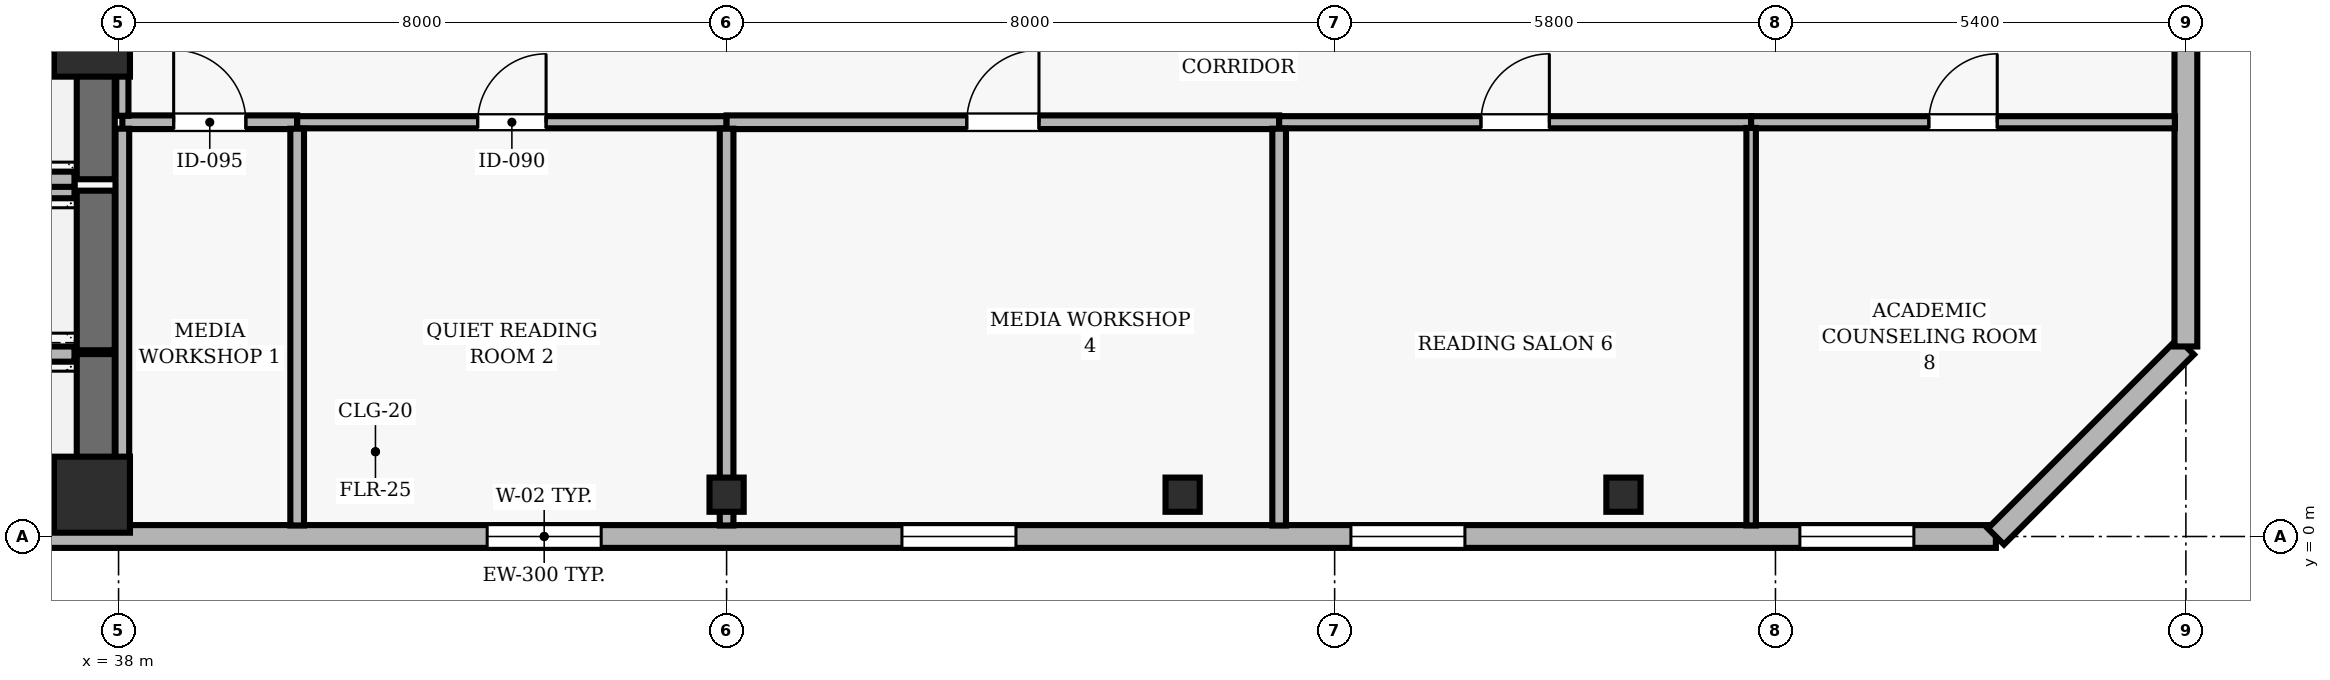
"""IFC4 building model, lengths in metres.
Left out: names, types, materials, properties, quantities, classifications, styles, units other than length and angle.
Written with IfcOpenShell. Run it as: python <this file> out.ifc"""

import sys

from ifc_helpers import new_model, si_unit, direction, frame, frame_2d, origin, origin_2d, place, context, subcontext, project, spatial, rectangle, hollow_rectangle, extrude, element, fill, save


model = new_model("IFC4")
c1 = context("Model", 3, precision=1e-05, world=origin(), true_north=direction((0.0, 1.0)))
c2 = subcontext(c1, "Body", "Model", "MODEL_VIEW")
j1 = project(units=[si_unit("LENGTHUNIT", "METRE"), si_unit("PLANEANGLEUNIT", "RADIAN")], contexts=[c1])
p1 = place(None, origin())
s1 = spatial("IfcSite", under=j1, at=p1, CompositionType="ELEMENT")
p2 = place(p1, origin())
s2 = spatial("IfcBuilding", under=s1, at=p2, CompositionType="ELEMENT")
p3 = place(p2, frame((0.0, 0.0, 203.1)))
s3 = spatial("IfcBuildingStorey", under=s2, at=p3, CompositionType="ELEMENT", Elevation=203.1)
for number, where, z_axis, x_axis in (
    (1, (37.65, 0.55, 0.0), (0.0, 0.0, 1.0), (1.0, 0.0, 0.0)),
    (2, (37.65, 6.55, 0.0), (0.0, 0.0, 1.0), (1.0, 0.0, 0.0)),
):
    element("IfcColumn", number, at=place(p3, frame(where, z_axis=z_axis, x_axis=x_axis)), inside=s3, PredefinedType="COLUMN", context=c2, shape_type="SweptSolid", body=[
        extrude(rectangle(XDim=1.0, YDim=1.0, at=origin_2d()), origin(), (0.0, 0.0, 1.0), 3.9),
    ])
for number, where, z_axis, x_axis in (
    (3, (46.0, 0.55, 0.0), (0.0, 0.0, 1.0), (1.0, 0.0, 0.0)),
    (4, (52.0, 0.55, 0.0), (0.0, 0.0, 1.0), (1.0, 0.0, 0.0)),
    (5, (57.8, 0.55, 0.0), (0.0, 0.0, 1.0), (1.0, 0.0, 0.0)),
):
    element("IfcColumn", number, at=place(p3, frame(where, z_axis=z_axis, x_axis=x_axis)), inside=s3, PredefinedType="COLUMN", context=c2, shape_type="SweptSolid", body=[
        extrude(hollow_rectangle(XDim=0.45, YDim=0.45, WallThickness=0.02, at=origin_2d()), origin(), (0.0, 0.0, 1.0), 3.9),
    ])
p4 = place(p3, frame((24.5, 0.0, 0.0), z_axis=(0.0, 0.0, 1.0), x_axis=(1.0, 0.0, 0.0)))
e6 = element("IfcWall", 6, at=p4, inside=s3, PredefinedType="SOLIDWALL", context=c2, shape_type="SweptSolid", body=[
    extrude(rectangle(XDim=38.2, YDim=0.3, at=frame_2d((19.1, 0.0))), origin(), (0.0, 0.0, 1.0), 3.69),
])
p5 = place(p4, frame((1.979, 0.0, 0.9)))
e7 = element("IfcOpeningElement", 7, at=p5, cuts=e6, PredefinedType="OPENING", context=c2, shape_type="SweptSolid", body=[
    extrude(rectangle(XDim=1.5, YDim=1.6, at=frame_2d((0.75, 0.8))), frame((0.0, 0.16, 0.0), z_axis=(0.0, -1.0, 0.0), x_axis=(1.0, 0.0, 0.0)), (0.0, 0.0, 1.0), 0.32),
])
p6 = place(p4, frame((8.336, 0.0, 0.9)))
e8 = element("IfcOpeningElement", 8, at=p6, cuts=e6, PredefinedType="OPENING", context=c2, shape_type="SweptSolid", body=[
    extrude(rectangle(XDim=1.5, YDim=1.6, at=frame_2d((0.75, 0.8))), frame((0.0, 0.16, 0.0), z_axis=(0.0, -1.0, 0.0), x_axis=(1.0, 0.0, 0.0)), (0.0, 0.0, 1.0), 0.32),
])
p7 = place(p4, frame((18.35, 0.0, 0.9)))
e9 = element("IfcOpeningElement", 9, at=p7, cuts=e6, PredefinedType="OPENING", context=c2, shape_type="SweptSolid", body=[
    extrude(rectangle(XDim=1.5, YDim=1.6, at=frame_2d((0.75, 0.8))), frame((0.0, 0.16, 0.0), z_axis=(0.0, -1.0, 0.0), x_axis=(1.0, 0.0, 0.0)), (0.0, 0.0, 1.0), 0.32),
])
p8 = place(p4, frame((23.807, 0.0, 0.9)))
e10 = element("IfcOpeningElement", 10, at=p8, cuts=e6, PredefinedType="OPENING", context=c2, shape_type="SweptSolid", body=[
    extrude(rectangle(XDim=1.5, YDim=1.6, at=frame_2d((0.75, 0.8))), frame((0.0, 0.16, 0.0), z_axis=(0.0, -1.0, 0.0), x_axis=(1.0, 0.0, 0.0)), (0.0, 0.0, 1.0), 0.32),
])
p9 = place(p4, frame((29.714, 0.0, 0.9)))
e11 = element("IfcOpeningElement", 11, at=p9, cuts=e6, PredefinedType="OPENING", context=c2, shape_type="SweptSolid", body=[
    extrude(rectangle(XDim=1.5, YDim=1.6, at=frame_2d((0.75, 0.8))), frame((0.0, 0.16, 0.0), z_axis=(0.0, -1.0, 0.0), x_axis=(1.0, 0.0, 0.0)), (0.0, 0.0, 1.0), 0.32),
])
p10 = place(p4, frame((35.621, 0.0, 0.9)))
e12 = element("IfcOpeningElement", 12, at=p10, cuts=e6, PredefinedType="OPENING", context=c2, shape_type="SweptSolid", body=[
    extrude(rectangle(XDim=1.5, YDim=1.6, at=frame_2d((0.75, 0.8))), frame((0.0, 0.16, 0.0), z_axis=(0.0, -1.0, 0.0), x_axis=(1.0, 0.0, 0.0)), (0.0, 0.0, 1.0), 0.32),
])
p11 = place(p3, frame((62.7, 0.0, 0.0), z_axis=(0.0, 0.0, 1.0), x_axis=(0.707106781187, 0.707106781187, 0.0)))
e13 = element("IfcWall", 13, at=p11, inside=s3, PredefinedType="SOLIDWALL", context=c2, shape_type="SweptSolid", body=[
    extrude(rectangle(XDim=3.536, YDim=0.3, at=frame_2d((1.768, 0.0))), origin(), (0.0, 0.0, 1.0), 3.69),
])
p12 = place(p3, frame((65.2, 2.5, 0.0), z_axis=(0.0, 0.0, 1.0), x_axis=(0.0, 1.0, 0.0)))
e14 = element("IfcWall", 14, at=p12, inside=s3, PredefinedType="SOLIDWALL", context=c2, shape_type="SweptSolid", body=[
    extrude(rectangle(XDim=11.0, YDim=0.3, at=frame_2d((5.5, 0.0))), origin(), (0.0, 0.0, 1.0), 3.69),
])
p13 = place(p12, frame((7.2, 0.0, 0.9)))
e15 = element("IfcOpeningElement", 15, at=p13, cuts=e14, PredefinedType="OPENING", context=c2, shape_type="SweptSolid", body=[
    extrude(rectangle(XDim=2.1, YDim=1.6, at=frame_2d((1.05, 0.8))), frame((0.0, 0.16, 0.0), z_axis=(0.0, -1.0, 0.0), x_axis=(1.0, 0.0, 0.0)), (0.0, 0.0, 1.0), 0.32),
])
p14 = place(p3, frame((37.7, 0.3, 0.0), z_axis=(0.0, 0.0, 1.0), x_axis=(0.0, 1.0, 0.0)))
e16 = element("IfcWall", 16, at=p14, inside=s3, PredefinedType="SHEAR", context=c2, shape_type="SweptSolid", body=[
    extrude(rectangle(XDim=2.1, YDim=0.5, at=frame_2d((1.05, 0.0))), origin(), (0.0, 0.0, 1.0), 3.69),
])
for number, where, z_axis, x_axis in (
    (17, (35.28, 0.3, 0.0), (0.0, 0.0, 1.0), (1.0, 0.0, 0.0)),
    (18, (37.42, 2.4, 0.0), (0.0, 0.0, 1.0), (-1.0, 0.0, 0.0)),
):
    element("IfcWall", number, at=place(p3, frame(where, z_axis=z_axis, x_axis=x_axis)), inside=s3, PredefinedType="SOLIDWALL", context=c2, shape_type="SweptSolid", body=[
        extrude(rectangle(XDim=2.14, YDim=0.2, at=frame_2d((1.07, 0.0))), origin(), (0.0, 0.0, 1.0), 3.69),
    ])
p15 = place(p3, frame((37.7, 2.45, 0.0), z_axis=(0.0, 0.0, 1.0), x_axis=(0.0, 1.0, 0.0)))
e19 = element("IfcWall", 19, at=p15, inside=s3, PredefinedType="SHEAR", context=c2, shape_type="SweptSolid", body=[
    extrude(rectangle(XDim=2.1, YDim=0.5, at=frame_2d((1.05, 0.0))), origin(), (0.0, 0.0, 1.0), 3.69),
])
p16 = place(p3, frame((37.42, 4.55, 0.0), z_axis=(0.0, 0.0, 1.0), x_axis=(-1.0, 0.0, 0.0)))
e20 = element("IfcWall", 20, at=p16, inside=s3, PredefinedType="SOLIDWALL", context=c2, shape_type="SweptSolid", body=[
    extrude(rectangle(XDim=2.14, YDim=0.2, at=frame_2d((1.07, 0.0))), origin(), (0.0, 0.0, 1.0), 3.69),
])
p17 = place(p3, frame((37.7, 4.7, 0.0), z_axis=(0.0, 0.0, 1.0), x_axis=(0.0, 1.0, 0.0)))
e21 = element("IfcWall", 21, at=p17, inside=s3, PredefinedType="SHEAR", context=c2, shape_type="SweptSolid", body=[
    extrude(rectangle(XDim=2.25, YDim=0.5, at=frame_2d((1.125, 0.0))), origin(), (0.0, 0.0, 1.0), 3.69),
])
p18 = place(p3, frame((35.28, 4.7, 0.0), z_axis=(0.0, 0.0, 1.0), x_axis=(1.0, 0.0, 0.0)))
e22 = element("IfcWall", 22, at=p18, inside=s3, PredefinedType="SOLIDWALL", context=c2, shape_type="SweptSolid", body=[
    extrude(rectangle(XDim=2.14, YDim=0.2, at=frame_2d((1.07, 0.0))), origin(), (0.0, 0.0, 1.0), 3.69),
])
p19 = place(p3, frame((38.05, 5.45, 0.0), z_axis=(0.0, 0.0, 1.0), x_axis=(1.0, 0.0, 0.0)))
e23 = element("IfcWall", 23, at=p19, inside=s3, PredefinedType="PARTITIONING", context=c2, shape_type="SweptSolid", body=[
    extrude(rectangle(XDim=2.3, YDim=0.18, at=frame_2d((1.15, 0.0))), origin(), (0.0, 0.0, 1.0), 3.372),
])
p20 = place(p19, frame((0.675, 0.0, 0.0)))
e24 = element("IfcOpeningElement", 24, at=p20, cuts=e23, PredefinedType="OPENING", context=c2, shape_type="SweptSolid", body=[
    extrude(rectangle(XDim=0.95, YDim=2.1, at=frame_2d((0.475, 1.05))), frame((0.0, 0.1, 0.0), z_axis=(0.0, -1.0, 0.0), x_axis=(1.0, 0.0, 0.0)), (0.0, 0.0, 1.0), 0.2),
])
p21 = place(p3, frame((40.35, 5.45, 0.0), z_axis=(0.0, 0.0, 1.0), x_axis=(1.0, 0.0, 0.0)))
e25 = element("IfcWall", 25, at=p21, inside=s3, PredefinedType="PARTITIONING", context=c2, shape_type="SweptSolid", body=[
    extrude(rectangle(XDim=5.65, YDim=0.16, at=frame_2d((2.825, 0.0))), origin(), (0.0, 0.0, 1.0), 3.372),
])
p22 = place(p21, frame((2.375, 0.0, 0.0)))
e26 = element("IfcOpeningElement", 26, at=p22, cuts=e25, PredefinedType="OPENING", context=c2, shape_type="SweptSolid", body=[
    extrude(rectangle(XDim=0.9, YDim=2.1, at=frame_2d((0.45, 1.05))), frame((0.0, 0.09, 0.0), z_axis=(0.0, -1.0, 0.0), x_axis=(1.0, 0.0, 0.0)), (0.0, 0.0, 1.0), 0.18),
])
p23 = place(p3, frame((46.0, 5.45, 0.0), z_axis=(0.0, 0.0, 1.0), x_axis=(1.0, 0.0, 0.0)))
e27 = element("IfcWall", 27, at=p23, inside=s3, PredefinedType="PARTITIONING", context=c2, shape_type="SweptSolid", body=[
    extrude(rectangle(XDim=7.27, YDim=0.18, at=frame_2d((3.635, 0.0))), origin(), (0.0, 0.0, 1.0), 3.372),
])
p24 = place(p23, frame((3.16, 0.0, 0.0)))
e28 = element("IfcOpeningElement", 28, at=p24, cuts=e27, PredefinedType="OPENING", context=c2, shape_type="SweptSolid", body=[
    extrude(rectangle(XDim=0.95, YDim=2.1, at=frame_2d((0.475, 1.05))), frame((0.0, 0.1, 0.0), z_axis=(0.0, -1.0, 0.0), x_axis=(1.0, 0.0, 0.0)), (0.0, 0.0, 1.0), 0.2),
])
p25 = place(p3, frame((53.27, 5.45, 0.0), z_axis=(0.0, 0.0, 1.0), x_axis=(1.0, 0.0, 0.0)))
e29 = element("IfcWall", 29, at=p25, inside=s3, PredefinedType="PARTITIONING", context=c2, shape_type="SweptSolid", body=[
    extrude(rectangle(XDim=6.21, YDim=0.16, at=frame_2d((3.105, 0.0))), origin(), (0.0, 0.0, 1.0), 3.372),
])
p26 = place(p25, frame((2.655, 0.0, 0.0)))
e30 = element("IfcOpeningElement", 30, at=p26, cuts=e29, PredefinedType="OPENING", context=c2, shape_type="SweptSolid", body=[
    extrude(rectangle(XDim=0.9, YDim=2.1, at=frame_2d((0.45, 1.05))), frame((0.0, 0.09, 0.0), z_axis=(0.0, -1.0, 0.0), x_axis=(1.0, 0.0, 0.0)), (0.0, 0.0, 1.0), 0.18),
])
p27 = place(p3, frame((59.48, 5.45, 0.0), z_axis=(0.0, 0.0, 1.0), x_axis=(1.0, 0.0, 0.0)))
e31 = element("IfcWall", 31, at=p27, inside=s3, PredefinedType="PARTITIONING", context=c2, shape_type="SweptSolid", body=[
    extrude(rectangle(XDim=5.575, YDim=0.16, at=frame_2d((2.788, 0.0))), origin(), (0.0, 0.0, 1.0), 3.69),
])
p28 = place(p27, frame((2.338, 0.0, 0.0)))
e32 = element("IfcOpeningElement", 32, at=p28, cuts=e31, PredefinedType="OPENING", context=c2, shape_type="SweptSolid", body=[
    extrude(rectangle(XDim=0.9, YDim=2.1, at=frame_2d((0.45, 1.05))), frame((0.0, 0.09, 0.0), z_axis=(0.0, -1.0, 0.0), x_axis=(1.0, 0.0, 0.0)), (0.0, 0.0, 1.0), 0.18),
])
p29 = place(p3, frame((38.05, 5.365, 0.0), z_axis=(0.0, 0.0, 1.0), x_axis=(0.0, -1.0, 0.0)))
e33 = element("IfcWall", 33, at=p29, inside=s3, PredefinedType="PARTITIONING", context=c2, shape_type="SweptSolid", body=[
    extrude(rectangle(XDim=5.22, YDim=0.18, at=frame_2d((2.61, 0.0))), origin(), (0.0, 0.0, 1.0), 3.146),
])
p30 = place(p3, frame((38.05, 7.05, 0.0), z_axis=(0.0, 0.0, 1.0), x_axis=(0.0, -1.0, 0.0)))
e34 = element("IfcWall", 34, at=p30, inside=s3, PredefinedType="PARTITIONING", context=c2, shape_type="SweptSolid", body=[
    extrude(rectangle(XDim=1.515, YDim=0.16, at=frame_2d((0.758, 0.0))), origin(), (0.0, 0.0, 1.0), 3.146),
])
p31 = place(p3, frame((40.35, 0.145, 0.0), z_axis=(0.0, 0.0, 1.0), x_axis=(0.0, 1.0, 0.0)))
e35 = element("IfcWall", 35, at=p31, inside=s3, PredefinedType="PARTITIONING", context=c2, shape_type="SweptSolid", body=[
    extrude(rectangle(XDim=5.22, YDim=0.18, at=frame_2d((2.61, 0.0))), origin(), (0.0, 0.0, 1.0), 3.69),
])
p32 = place(p3, frame((46.0, 0.145, 0.0), z_axis=(0.0, 0.0, 1.0), x_axis=(0.0, 1.0, 0.0)))
e36 = element("IfcWall", 36, at=p32, inside=s3, PredefinedType="PARTITIONING", context=c2, shape_type="SweptSolid", body=[
    extrude(rectangle(XDim=5.22, YDim=0.18, at=frame_2d((2.61, 0.0))), origin(), (0.0, 0.0, 1.0), 3.146),
])
p33 = place(p3, frame((53.27, 0.145, 0.0), z_axis=(0.0, 0.0, 1.0), x_axis=(0.0, 1.0, 0.0)))
e37 = element("IfcWall", 37, at=p33, inside=s3, PredefinedType="PARTITIONING", context=c2, shape_type="SweptSolid", body=[
    extrude(rectangle(XDim=5.22, YDim=0.18, at=frame_2d((2.61, 0.0))), origin(), (0.0, 0.0, 1.0), 3.69),
])
p34 = place(p3, frame((59.48, 0.145, 0.0), z_axis=(0.0, 0.0, 1.0), x_axis=(0.0, 1.0, 0.0)))
e38 = element("IfcWall", 38, at=p34, inside=s3, PredefinedType="PARTITIONING", context=c2, shape_type="SweptSolid", body=[
    extrude(rectangle(XDim=5.23, YDim=0.125, at=frame_2d((2.615, 0.0))), origin(), (0.0, 0.0, 1.0), 3.69),
])
p35 = place(p7, origin())
e39 = element("IfcWindow", 39, at=p35, inside=s3, PartitioningType="SINGLE_PANEL", PredefinedType="WINDOW", context=c2, shape_type="SweptSolid", body=[
    extrude(rectangle(XDim=1.5, YDim=1.6, at=frame_2d((0.75, 0.8))), frame((0.0, 0.03, 0.0), z_axis=(0.0, -1.0, 0.0), x_axis=(1.0, 0.0, 0.0)), (0.0, 0.0, 1.0), 0.06),
])
fill(e9, e39)
p36 = place(p8, origin())
e40 = element("IfcWindow", 40, at=p36, inside=s3, PartitioningType="SINGLE_PANEL", PredefinedType="WINDOW", context=c2, shape_type="SweptSolid", body=[
    extrude(rectangle(XDim=1.5, YDim=1.6, at=frame_2d((0.75, 0.8))), frame((0.0, 0.03, 0.0), z_axis=(0.0, -1.0, 0.0), x_axis=(1.0, 0.0, 0.0)), (0.0, 0.0, 1.0), 0.06),
])
fill(e10, e40)
p37 = place(p9, origin())
e41 = element("IfcWindow", 41, at=p37, inside=s3, PartitioningType="SINGLE_PANEL", PredefinedType="WINDOW", context=c2, shape_type="SweptSolid", body=[
    extrude(rectangle(XDim=1.5, YDim=1.6, at=frame_2d((0.75, 0.8))), frame((0.0, 0.03, 0.0), z_axis=(0.0, -1.0, 0.0), x_axis=(1.0, 0.0, 0.0)), (0.0, 0.0, 1.0), 0.06),
])
fill(e11, e41)
p38 = place(p10, origin())
e42 = element("IfcWindow", 42, at=p38, inside=s3, PartitioningType="SINGLE_PANEL", PredefinedType="WINDOW", context=c2, shape_type="SweptSolid", body=[
    extrude(rectangle(XDim=1.5, YDim=1.6, at=frame_2d((0.75, 0.8))), frame((0.0, 0.03, 0.0), z_axis=(0.0, -1.0, 0.0), x_axis=(1.0, 0.0, 0.0)), (0.0, 0.0, 1.0), 0.06),
])
fill(e12, e42)
p39 = place(p20, origin())
e43 = element("IfcDoor", 43, at=p39, inside=s3, OperationType="SINGLE_SWING_LEFT", PredefinedType="DOOR", context=c2, shape_type="SweptSolid", body=[
    extrude(rectangle(XDim=0.95, YDim=2.1, at=frame_2d((0.475, 1.05))), frame((0.0, 0.025, 0.0), z_axis=(0.0, -1.0, 0.0), x_axis=(1.0, 0.0, 0.0)), (0.0, 0.0, 1.0), 0.05),
])
fill(e24, e43)
p40 = place(p22, origin())
e44 = element("IfcDoor", 44, at=p40, inside=s3, OperationType="SINGLE_SWING_RIGHT", PredefinedType="DOOR", context=c2, shape_type="SweptSolid", body=[
    extrude(rectangle(XDim=0.9, YDim=2.1, at=frame_2d((0.45, 1.05))), frame((0.0, 0.025, 0.0), z_axis=(0.0, -1.0, 0.0), x_axis=(1.0, 0.0, 0.0)), (0.0, 0.0, 1.0), 0.05),
])
fill(e26, e44)
p41 = place(p24, origin())
e45 = element("IfcDoor", 45, at=p41, inside=s3, OperationType="SINGLE_SWING_RIGHT", PredefinedType="DOOR", context=c2, shape_type="SweptSolid", body=[
    extrude(rectangle(XDim=0.95, YDim=2.1, at=frame_2d((0.475, 1.05))), frame((0.0, 0.025, 0.0), z_axis=(0.0, -1.0, 0.0), x_axis=(1.0, 0.0, 0.0)), (0.0, 0.0, 1.0), 0.05),
])
fill(e28, e45)
p42 = place(p26, origin())
e46 = element("IfcDoor", 46, at=p42, inside=s3, OperationType="SINGLE_SWING_RIGHT", PredefinedType="DOOR", context=c2, shape_type="SweptSolid", body=[
    extrude(rectangle(XDim=0.9, YDim=2.1, at=frame_2d((0.45, 1.05))), frame((0.0, 0.025, 0.0), z_axis=(0.0, -1.0, 0.0), x_axis=(1.0, 0.0, 0.0)), (0.0, 0.0, 1.0), 0.05),
])
fill(e30, e46)
p43 = place(p28, origin())
e47 = element("IfcDoor", 47, at=p43, inside=s3, OperationType="SINGLE_SWING_RIGHT", PredefinedType="DOOR", context=c2, shape_type="SweptSolid", body=[
    extrude(rectangle(XDim=0.9, YDim=2.1, at=frame_2d((0.45, 1.05))), frame((0.0, 0.025, 0.0), z_axis=(0.0, -1.0, 0.0), x_axis=(1.0, 0.0, 0.0)), (0.0, 0.0, 1.0), 0.05),
])
fill(e32, e47)
save(model, sys.argv[1])
